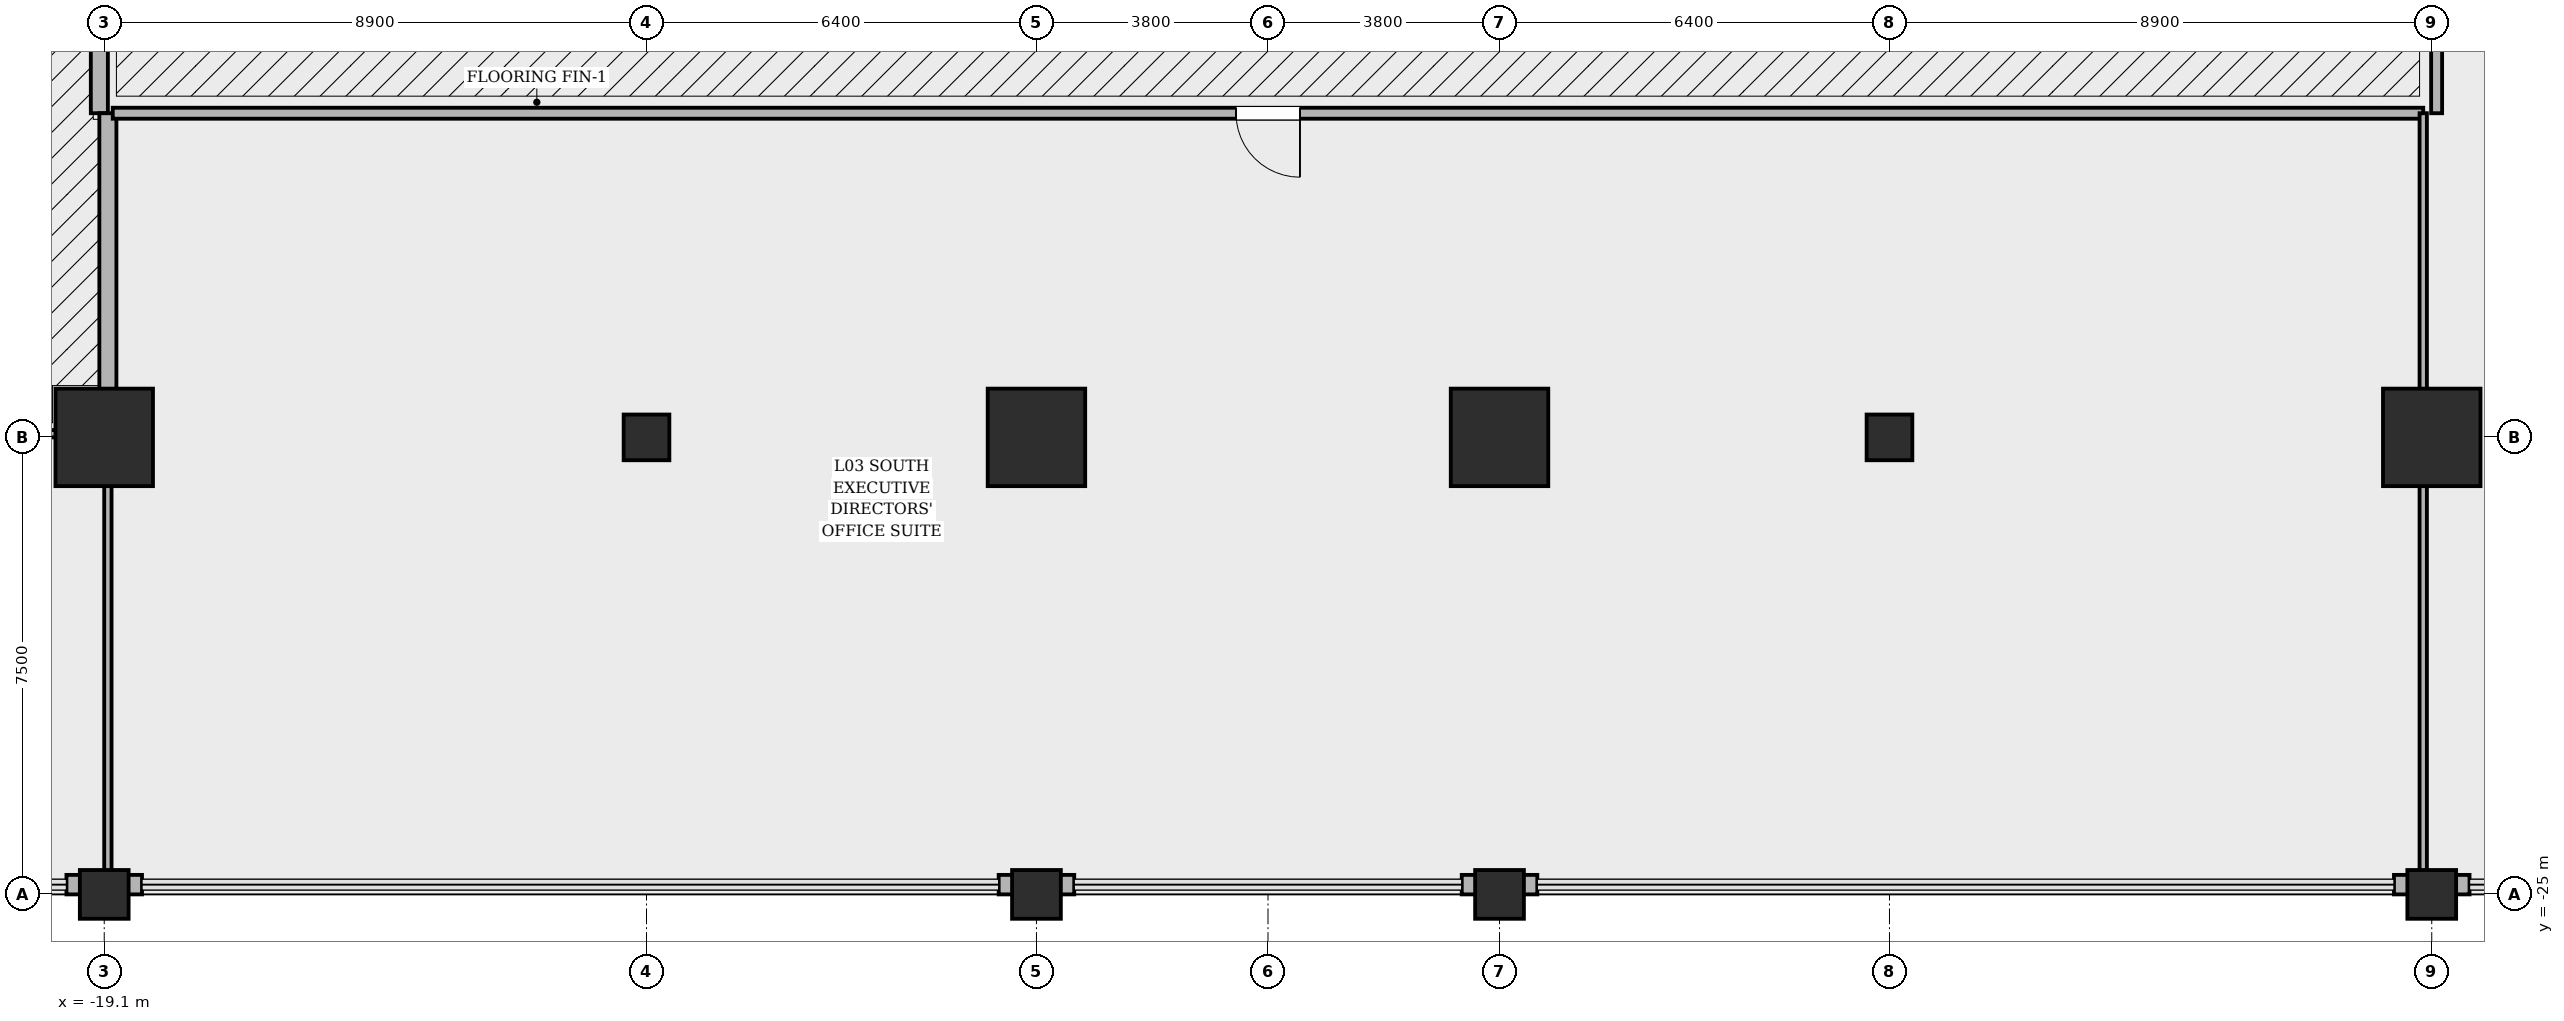
"""IFC4 building model, lengths in metres.
Left out: names, types, materials, properties, quantities, classifications, styles, units other than length and angle.
Written with IfcOpenShell. Run it as: python <this file> out.ifc"""

import sys

from ifc_helpers import new_model, si_unit, direction, frame, frame_2d, origin, origin_2d, place, context, subcontext, project, spatial, rectangle, hollow_rectangle, circle, extrude, element, fill, save


model = new_model("IFC4")
c1 = context("Model", 3, precision=1e-05, world=origin(), true_north=direction((0.0, 1.0)))
c2 = subcontext(c1, "Body", "Model", "MODEL_VIEW")
j1 = project(units=[si_unit("LENGTHUNIT", "METRE"), si_unit("PLANEANGLEUNIT", "RADIAN")], contexts=[c1])
p1 = place(None, origin())
s1 = spatial("IfcSite", under=j1, at=p1, CompositionType="ELEMENT")
p2 = place(p1, origin())
s2 = spatial("IfcBuilding", under=s1, at=p2, CompositionType="ELEMENT")
p3 = place(p2, frame((0.0, 0.0, 16.8)))
s3 = spatial("IfcBuildingStorey", under=s2, at=p3, CompositionType="ELEMENT", Elevation=16.8)
for number, where, z_axis, x_axis in (
    (1, (-19.1, -17.5, 0.0), (0.0, 0.0, 1.0), (1.0, 0.0, 0.0)),
    (2, (-3.8, -17.5, 0.0), (0.0, 0.0, 1.0), (1.0, 0.0, 0.0)),
    (3, (3.8, -17.5, 0.0), (0.0, 0.0, 1.0), (1.0, 0.0, 0.0)),
    (4, (19.1, -17.5, 0.0), (0.0, 0.0, 1.0), (1.0, 0.0, 0.0)),
):
    element("IfcColumn", number, at=place(p3, frame(where, z_axis=z_axis, x_axis=x_axis)), inside=s3, PredefinedType="COLUMN", context=c2, shape_type="SweptSolid", body=[
        extrude(hollow_rectangle(XDim=1.6, YDim=1.6, WallThickness=0.05, at=origin_2d()), origin(), (0.0, 0.0, 1.0), 5.4),
    ])
for number, where, z_axis, x_axis in (
    (5, (-19.1, -25.0, 0.0), (0.0, 0.0, 1.0), (1.0, 0.0, 0.0)),
    (6, (-3.8, -25.0, 0.0), (0.0, 0.0, 1.0), (1.0, 0.0, 0.0)),
    (7, (3.8, -25.0, 0.0), (0.0, 0.0, 1.0), (1.0, 0.0, 0.0)),
    (8, (19.1, -25.0, 0.0), (0.0, 0.0, 1.0), (1.0, 0.0, 0.0)),
):
    element("IfcColumn", number, at=place(p3, frame(where, z_axis=z_axis, x_axis=x_axis)), inside=s3, PredefinedType="COLUMN", context=c2, shape_type="SweptSolid", body=[
        extrude(rectangle(XDim=0.8, YDim=0.8, at=origin_2d()), origin(), (0.0, 0.0, 1.0), 5.4),
    ])
for number, where, z_axis, x_axis in (
    (9, (-10.2, -17.5, 0.0), (0.0, 0.0, 1.0), (1.0, 0.0, 0.0)),
    (10, (10.2, -17.5, 0.0), (0.0, 0.0, 1.0), (1.0, 0.0, 0.0)),
):
    element("IfcColumn", number, at=place(p3, frame(where, z_axis=z_axis, x_axis=x_axis)), inside=s3, PredefinedType="PILASTER", context=c2, shape_type="SweptSolid", body=[
        extrude(circle(Radius=0.375, at=origin_2d()), origin(), (0.0, 0.0, 1.0), 5.4),
    ])
for number, where, z_axis, x_axis in (
    (11, (-19.72, -24.84, 0.0), (0.0, 0.0, 1.0), (1.0, 0.0, 0.0)),
    (12, (-4.42, -24.84, 0.0), (0.0, 0.0, 1.0), (1.0, 0.0, 0.0)),
    (13, (3.18, -24.84, 0.0), (0.0, 0.0, 1.0), (1.0, 0.0, 0.0)),
    (14, (18.48, -24.84, 0.0), (0.0, 0.0, 1.0), (1.0, 0.0, 0.0)),
):
    element("IfcWall", number, at=place(p3, frame(where, z_axis=z_axis, x_axis=x_axis)), inside=s3, PredefinedType="SOLIDWALL", context=c2, shape_type="SweptSolid", body=[
        extrude(rectangle(XDim=1.24, YDim=0.32, at=frame_2d((0.62, 0.0))), origin(), (0.0, 0.0, 1.0), 4.314),
    ])
p4 = place(p3, frame((-36.78, -17.44, 0.0), z_axis=(0.0, 0.0, 1.0), x_axis=(1.0, 0.0, 0.0)))
e15 = element("IfcWall", 15, at=p4, inside=s3, PredefinedType="PARTITIONING", context=c2, shape_type="SweptSolid", body=[
    extrude(rectangle(XDim=17.74, YDim=0.12, at=frame_2d((8.87, 0.0))), origin(), (0.0, 0.0, 1.0), 3.164),
])
p5 = place(p4, frame((9.695, 0.0, 0.0)))
e16 = element("IfcOpeningElement", 16, at=p5, cuts=e15, PredefinedType="OPENING", context=c2, shape_type="SweptSolid", body=[
    extrude(rectangle(XDim=1.05, YDim=2.2, at=frame_2d((0.525, 1.1))), frame((0.0, 0.07, 0.0), z_axis=(0.0, -1.0, 0.0), x_axis=(1.0, 0.0, 0.0)), (0.0, 0.0, 1.0), 0.14),
])
p6 = place(p3, frame((-19.04, -17.44, 0.0), z_axis=(0.0, 0.0, 1.0), x_axis=(0.0, -1.0, 0.0)))
e17 = element("IfcWall", 17, at=p6, inside=s3, PredefinedType="PARTITIONING", context=c2, shape_type="SweptSolid", body=[
    extrude(rectangle(XDim=7.34, YDim=0.12, at=frame_2d((3.67, 0.0))), origin(), (0.0, 0.0, 1.0), 3.164),
])
p7 = place(p3, frame((-19.18, 17.36, 0.0), z_axis=(0.0, 0.0, 1.0), x_axis=(0.0, -1.0, 0.0)))
e18 = element("IfcWall", 18, at=p7, inside=s3, PredefinedType="SOLIDWALL", context=c2, shape_type="SweptSolid", body=[
    extrude(rectangle(XDim=29.54, YDim=0.28, at=frame_2d((14.77, 0.0))), origin(), (0.0, 0.0, 1.0), 3.164),
])
p8 = place(p7, frame((15.22, 0.0, 0.0)))
e19 = element("IfcOpeningElement", 19, at=p8, cuts=e18, PredefinedType="OPENING", context=c2, shape_type="SweptSolid", body=[
    extrude(rectangle(XDim=1.8, YDim=2.35, at=frame_2d((0.9, 1.175))), frame((0.0, 0.15, 0.0), z_axis=(0.0, -1.0, 0.0), x_axis=(1.0, 0.0, 0.0)), (0.0, 0.0, 1.0), 0.3),
])
p9 = place(p3, frame((-19.04, -12.18, 0.0), z_axis=(0.0, 0.0, 1.0), x_axis=(0.0, -1.0, 0.0)))
e20 = element("IfcWall", 20, at=p9, inside=s3, PredefinedType="SOLIDWALL", context=c2, shape_type="SweptSolid", body=[
    extrude(rectangle(XDim=5.18, YDim=0.28, at=frame_2d((2.59, 0.0))), origin(), (0.0, 0.0, 1.0), 3.164),
])
p10 = place(p3, frame((-18.96, -12.18, 0.0), z_axis=(0.0, 0.0, 1.0), x_axis=(1.0, 0.0, 0.0)))
e21 = element("IfcWall", 21, at=p10, inside=s3, PredefinedType="PARTITIONING", context=c2, shape_type="SweptSolid", body=[
    extrude(rectangle(XDim=37.92, YDim=0.18, at=frame_2d((18.96, 0.0))), origin(), (0.0, 0.0, 1.0), 4.314),
])
p11 = place(p10, frame((18.435, 0.0, 0.0)))
e22 = element("IfcOpeningElement", 22, at=p11, cuts=e21, PredefinedType="OPENING", context=c2, shape_type="SweptSolid", body=[
    extrude(rectangle(XDim=1.05, YDim=2.2, at=frame_2d((0.525, 1.1))), frame((0.0, 0.1, 0.0), z_axis=(0.0, -1.0, 0.0), x_axis=(1.0, 0.0, 0.0)), (0.0, 0.0, 1.0), 0.2),
])
p12 = place(p3, frame((18.96, -12.18, 0.0), z_axis=(0.0, 0.0, 1.0), x_axis=(0.0, -1.0, 0.0)))
e23 = element("IfcWall", 23, at=p12, inside=s3, PredefinedType="PARTITIONING", context=c2, shape_type="SweptSolid", body=[
    extrude(rectangle(XDim=12.6, YDim=0.12, at=frame_2d((6.3, 0.0))), origin(), (0.0, 0.0, 1.0), 4.314),
])
p13 = place(p3, frame((19.18, -12.18, 0.0), z_axis=(0.0, 0.0, 1.0), x_axis=(0.0, 1.0, 0.0)))
e24 = element("IfcWall", 24, at=p13, inside=s3, PredefinedType="PARTITIONING", context=c2, shape_type="SweptSolid", body=[
    extrude(rectangle(XDim=14.4, YDim=0.18, at=frame_2d((7.2, 0.0))), origin(), (0.0, 0.0, 1.0), 4.314),
])
p14 = place(p13, frame((6.05, 0.0, 0.0)))
e25 = element("IfcOpeningElement", 25, at=p14, cuts=e24, PredefinedType="OPENING", context=c2, shape_type="SweptSolid", body=[
    extrude(rectangle(XDim=1.4, YDim=2.25, at=frame_2d((0.7, 1.125))), frame((0.0, 0.1, 0.0), z_axis=(0.0, -1.0, 0.0), x_axis=(1.0, 0.0, 0.0)), (0.0, 0.0, 1.0), 0.2),
])
p15 = place(p11, origin())
e26 = element("IfcDoor", 26, at=p15, inside=s3, OperationType="SINGLE_SWING_RIGHT", PredefinedType="DOOR", context=c2, shape_type="SweptSolid", body=[
    extrude(rectangle(XDim=1.05, YDim=2.2, at=frame_2d((0.525, 1.1))), frame((0.0, 0.025, 0.0), z_axis=(0.0, -1.0, 0.0), x_axis=(1.0, 0.0, 0.0)), (0.0, 0.0, 1.0), 0.05),
])
fill(e22, e26)
save(model, sys.argv[1])
